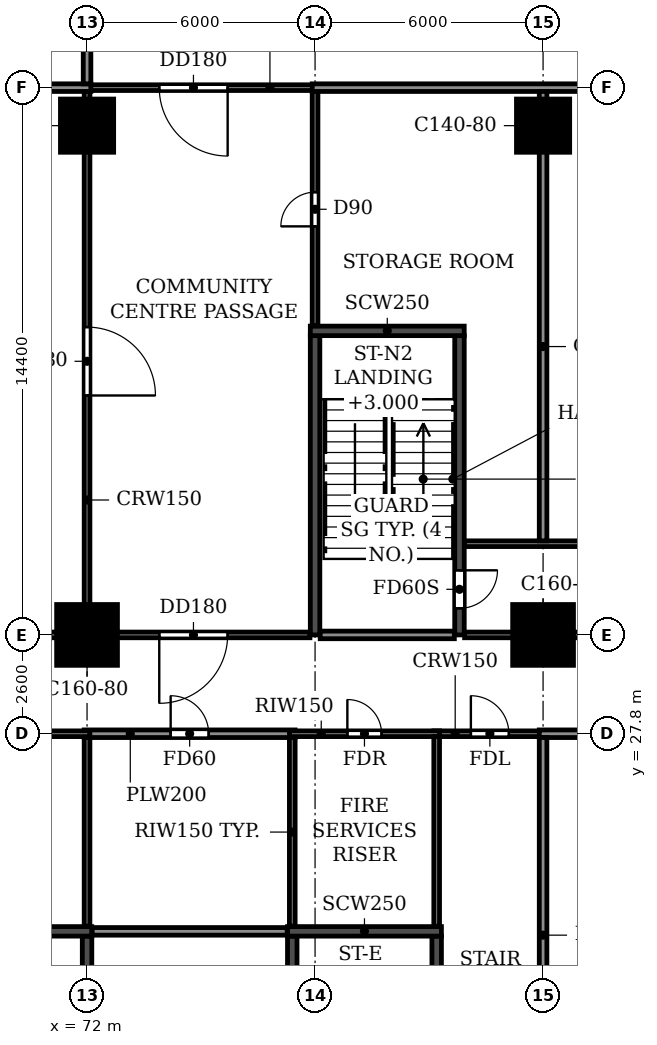
"""IFC4 building model, lengths in metres.
Left out: names, types, materials, properties, quantities, classifications, styles, units other than length and angle.
Written with IfcOpenShell. Run it as: python <this file> out.ifc"""

import sys

from ifc_helpers import new_model, si_unit, direction, frame, frame_2d, origin, origin_2d, place, context, subcontext, project, spatial, rectangle, extrude, source, transform, mapped, element, fill, save


model = new_model("IFC4")
c1 = context("Model", 3, precision=1e-05, world=origin(), true_north=direction((0.0, 1.0)))
c2 = subcontext(c1, "Body", "Model", "MODEL_VIEW")
j1 = project(units=[si_unit("LENGTHUNIT", "METRE"), si_unit("PLANEANGLEUNIT", "RADIAN")], contexts=[c1])
p1 = place(None, origin())
s1 = spatial("IfcSite", under=j1, at=p1, CompositionType="ELEMENT")
p2 = place(p1, origin())
s2 = spatial("IfcBuilding", under=s1, at=p2, CompositionType="ELEMENT")
p3 = place(p2, origin())
s3 = spatial("IfcBuildingStorey", under=s2, at=p3, CompositionType="ELEMENT", Elevation=0.0)
m1 = source(origin(), c2, "Body", "SweptSolid", [
    extrude(rectangle(XDim=1.6, YDim=1.6, at=origin_2d()), origin(), (0.0, 0.0, 1.0), 4.5),
])
p4 = place(p3, frame((72.0, 30.4, -0.3), z_axis=(0.0, 0.0, 1.0), x_axis=(1.0, 0.0, 0.0)))
e1 = element("IfcColumn", 1, at=p4, inside=s3, PredefinedType="COLUMN", context=c2, shape_type="MappedRepresentation", body=[
    mapped(m1, transform((0.0, 0.0, 0.0))),
])
m2 = source(origin(), c2, "Body", "SweptSolid", [
    extrude(rectangle(XDim=1.4, YDim=1.4, at=origin_2d()), origin(), (0.0, 0.0, 1.0), 4.5),
])
p5 = place(p3, frame((72.0, 43.8, -0.3), z_axis=(0.0, 0.0, 1.0), x_axis=(1.0, 0.0, 0.0)))
e2 = element("IfcColumn", 2, at=p5, inside=s3, PredefinedType="COLUMN", context=c2, shape_type="MappedRepresentation", body=[
    mapped(m2, transform((0.0, 0.0, 0.0))),
])
p6 = place(p3, frame((84.0, 30.4, -0.3), z_axis=(0.0, 0.0, 1.0), x_axis=(1.0, 0.0, 0.0)))
e3 = element("IfcColumn", 3, at=p6, inside=s3, PredefinedType="COLUMN", context=c2, shape_type="MappedRepresentation", body=[
    mapped(m1, transform((0.0, 0.0, 0.0))),
])
p7 = place(p3, frame((84.0, 43.8, -0.3), z_axis=(0.0, 0.0, 1.0), x_axis=(1.0, 0.0, 0.0)))
e4 = element("IfcColumn", 4, at=p7, inside=s3, PredefinedType="COLUMN", context=c2, shape_type="MappedRepresentation", body=[
    mapped(m2, transform((0.0, 0.0, 0.0))),
])
p8 = place(p3, frame((72.0, 14.6, 0.0), z_axis=(0.0, 0.0, 1.0), x_axis=(0.0, 1.0, 0.0)))
e5 = element("IfcWall", 5, at=p8, inside=s3, PredefinedType="SOLIDWALL", context=c2, shape_type="SweptSolid", body=[
    extrude(rectangle(XDim=7.875, YDim=0.25, at=frame_2d((3.938, 0.0))), origin(), (0.0, 0.0, 1.0), 4.2),
])
p9 = place(p3, frame((68.075, 22.6, 0.0), z_axis=(0.0, 0.0, 1.0), x_axis=(1.0, 0.0, 0.0)))
e6 = element("IfcWall", 6, at=p9, inside=s3, PredefinedType="SOLIDWALL", context=c2, shape_type="SweptSolid", body=[
    extrude(rectangle(XDim=4.05, YDim=0.25, at=frame_2d((2.025, 0.0))), origin(), (0.0, 0.0, 1.0), 4.2),
])
p10 = place(p3, frame((77.4, 14.6, 0.0), z_axis=(0.0, 0.0, 1.0), x_axis=(0.0, 1.0, 0.0)))
e7 = element("IfcWall", 7, at=p10, inside=s3, PredefinedType="SOLIDWALL", context=c2, shape_type="SweptSolid", body=[
    extrude(rectangle(XDim=7.875, YDim=0.25, at=frame_2d((3.938, 0.0))), origin(), (0.0, 0.0, 1.0), 4.2),
])
p11 = place(p3, frame((81.2, 14.6, 0.0), z_axis=(0.0, 0.0, 1.0), x_axis=(0.0, 1.0, 0.0)))
e8 = element("IfcWall", 8, at=p11, inside=s3, PredefinedType="SOLIDWALL", context=c2, shape_type="SweptSolid", body=[
    extrude(rectangle(XDim=7.875, YDim=0.25, at=frame_2d((3.938, 0.0))), origin(), (0.0, 0.0, 1.0), 4.2),
])
p12 = place(p11, frame((0.7, 0.0, 0.0)))
e9 = element("IfcOpeningElement", 9, at=p12, cuts=e8, PredefinedType="OPENING", context=c2, shape_type="SweptSolid", body=[
    extrude(rectangle(XDim=1.0, YDim=2.1, at=frame_2d((0.5, 1.05))), frame((0.0, 0.135, 0.0), z_axis=(0.0, -1.0, 0.0), x_axis=(1.0, 0.0, 0.0)), (0.0, 0.0, 1.0), 0.27),
])
p13 = place(p3, frame((77.275, 22.6, 0.0), z_axis=(0.0, 0.0, 1.0), x_axis=(1.0, 0.0, 0.0)))
e10 = element("IfcWall", 10, at=p13, inside=s3, PredefinedType="SOLIDWALL", context=c2, shape_type="SweptSolid", body=[
    extrude(rectangle(XDim=4.05, YDim=0.25, at=frame_2d((2.025, 0.0))), origin(), (0.0, 0.0, 1.0), 4.2),
])
p14 = place(p3, frame((81.8, 30.4, 0.0), z_axis=(0.0, 0.0, 1.0), x_axis=(0.0, 1.0, 0.0)))
e11 = element("IfcWall", 11, at=p14, inside=s3, PredefinedType="SOLIDWALL", context=c2, shape_type="SweptSolid", body=[
    extrude(rectangle(XDim=7.875, YDim=0.25, at=frame_2d((3.938, 0.0))), origin(), (0.0, 0.0, 1.0), 4.2),
])
p15 = place(p14, frame((0.7, 0.0, 0.0)))
e12 = element("IfcOpeningElement", 12, at=p15, cuts=e11, PredefinedType="OPENING", context=c2, shape_type="SweptSolid", body=[
    extrude(rectangle(XDim=1.0, YDim=2.1, at=frame_2d((0.5, 1.05))), frame((0.0, 0.135, 0.0), z_axis=(0.0, -1.0, 0.0), x_axis=(1.0, 0.0, 0.0)), (0.0, 0.0, 1.0), 0.27),
])
p16 = place(p3, frame((77.875, 38.4, 0.0), z_axis=(0.0, 0.0, 1.0), x_axis=(1.0, 0.0, 0.0)))
e13 = element("IfcWall", 13, at=p16, inside=s3, PredefinedType="SOLIDWALL", context=c2, shape_type="SweptSolid", body=[
    extrude(rectangle(XDim=4.05, YDim=0.25, at=frame_2d((2.025, 0.0))), origin(), (0.0, 0.0, 1.0), 4.2),
])
p17 = place(p3, frame((78.0, 30.4, 0.0), z_axis=(0.0, 0.0, 1.0), x_axis=(0.0, 1.0, 0.0)))
e14 = element("IfcWall", 14, at=p17, inside=s3, PredefinedType="SOLIDWALL", context=c2, shape_type="SweptSolid", body=[
    extrude(rectangle(XDim=7.875, YDim=0.25, at=frame_2d((3.938, 0.0))), origin(), (0.0, 0.0, 1.0), 4.2),
])
p18 = place(p3, frame((81.125, 27.8, 0.0), z_axis=(0.0, 0.0, 1.0), x_axis=(1.0, 0.0, 0.0)))
e15 = element("IfcWall", 15, at=p18, inside=s3, PredefinedType="PARTITIONING", context=c2, shape_type="SweptSolid", body=[
    extrude(rectangle(XDim=2.975, YDim=0.15, at=frame_2d((1.488, 0.0))), origin(), (0.0, 0.0, 1.0), 4.2),
])
p19 = place(p18, frame((0.975, 0.0, 0.0)))
e16 = element("IfcOpeningElement", 16, at=p19, cuts=e15, PredefinedType="OPENING", context=c2, shape_type="SweptSolid", body=[
    extrude(rectangle(XDim=1.0, YDim=2.1, at=frame_2d((0.5, 1.05))), frame((0.0, 0.085, 0.0), z_axis=(0.0, -1.0, 0.0), x_axis=(1.0, 0.0, 0.0)), (0.0, 0.0, 1.0), 0.17),
])
p20 = place(p3, frame((57.935, 30.4, 0.0), z_axis=(0.0, 0.0, 1.0), x_axis=(1.0, 0.0, 0.0)))
e17 = element("IfcWall", 17, at=p20, inside=s3, PredefinedType="PARTITIONING", context=c2, shape_type="SweptSolid", body=[
    extrude(rectangle(XDim=19.93, YDim=0.15, at=frame_2d((9.965, 0.0))), origin(), (0.0, 0.0, 1.0), 4.2),
])
p21 = place(p20, frame((0.065, 0.0, 0.0)))
e18 = element("IfcOpeningElement", 18, at=p21, cuts=e17, PredefinedType="OPENING", context=c2, shape_type="SweptSolid", body=[
    extrude(rectangle(XDim=0.9, YDim=2.1, at=frame_2d((0.45, 1.05))), frame((0.0, 0.085, 0.0), z_axis=(0.0, -1.0, 0.0), x_axis=(1.0, 0.0, 0.0)), (0.0, 0.0, 1.0), 0.17),
])
p22 = place(p20, frame((15.965, 0.0, 0.0)))
e19 = element("IfcOpeningElement", 19, at=p22, cuts=e17, PredefinedType="OPENING", context=c2, shape_type="SweptSolid", body=[
    extrude(rectangle(XDim=1.8, YDim=2.1, at=frame_2d((0.9, 1.05))), frame((0.0, 0.085, 0.0), z_axis=(0.0, -1.0, 0.0), x_axis=(1.0, 0.0, 0.0)), (0.0, 0.0, 1.0), 0.17),
])
p23 = place(p3, frame((81.935, 30.4, 0.0), z_axis=(0.0, 0.0, 1.0), x_axis=(1.0, 0.0, 0.0)))
e20 = element("IfcWall", 20, at=p23, inside=s3, PredefinedType="PARTITIONING", context=c2, shape_type="SweptSolid", body=[
    extrude(rectangle(XDim=20.065, YDim=0.15, at=frame_2d((10.032, 0.0))), origin(), (0.0, 0.0, 1.0), 4.2),
])
p24 = place(p23, frame((9.515, 0.0, 0.0)))
e21 = element("IfcOpeningElement", 21, at=p24, cuts=e20, PredefinedType="OPENING", context=c2, shape_type="SweptSolid", body=[
    extrude(rectangle(XDim=0.9, YDim=2.1, at=frame_2d((0.45, 1.05))), frame((0.0, 0.085, 0.0), z_axis=(0.0, -1.0, 0.0), x_axis=(1.0, 0.0, 0.0)), (0.0, 0.0, 1.0), 0.17),
])
p25 = place(p3, frame((81.935, 32.8, 0.0), z_axis=(0.0, 0.0, 1.0), x_axis=(1.0, 0.0, 0.0)))
e22 = element("IfcWall", 22, at=p25, inside=s3, PredefinedType="PARTITIONING", context=c2, shape_type="SweptSolid", body=[
    extrude(rectangle(XDim=20.065, YDim=0.15, at=frame_2d((10.032, 0.0))), origin(), (0.0, 0.0, 1.0), 4.2),
])
p26 = place(p25, frame((10.615, 0.0, 0.0)))
e23 = element("IfcOpeningElement", 23, at=p26, cuts=e22, PredefinedType="OPENING", context=c2, shape_type="SweptSolid", body=[
    extrude(rectangle(XDim=0.9, YDim=2.1, at=frame_2d((0.45, 1.05))), frame((0.0, 0.085, 0.0), z_axis=(0.0, -1.0, 0.0), x_axis=(1.0, 0.0, 0.0)), (0.0, 0.0, 1.0), 0.17),
])
p27 = place(p3, frame((71.9, 44.8, 0.0), z_axis=(0.0, 0.0, 1.0), x_axis=(1.0, 0.0, 0.0)))
e24 = element("IfcWall", 24, at=p27, inside=s3, PredefinedType="PARTITIONING", context=c2, shape_type="SweptSolid", body=[
    extrude(rectangle(XDim=6.175, YDim=0.15, at=frame_2d((3.087, 0.0))), origin(), (0.0, 0.0, 1.0), 4.2),
])
p28 = place(p27, frame((2.0, 0.0, 0.0)))
e25 = element("IfcOpeningElement", 25, at=p28, cuts=e24, PredefinedType="OPENING", context=c2, shape_type="SweptSolid", body=[
    extrude(rectangle(XDim=1.8, YDim=2.1, at=frame_2d((0.9, 1.05))), frame((0.0, 0.085, 0.0), z_axis=(0.0, -1.0, 0.0), x_axis=(1.0, 0.0, 0.0)), (0.0, 0.0, 1.0), 0.17),
])
p29 = place(p3, frame((72.0, 30.475, 0.0), z_axis=(0.0, 0.0, 1.0), x_axis=(0.0, 1.0, 0.0)))
e26 = element("IfcWall", 26, at=p29, inside=s3, PredefinedType="PARTITIONING", context=c2, shape_type="SweptSolid", body=[
    extrude(rectangle(XDim=14.225, YDim=0.15, at=frame_2d((7.112, 0.0))), origin(), (0.0, 0.0, 1.0), 4.2),
])
p30 = place(p29, frame((6.225, 0.0, 0.0)))
e27 = element("IfcOpeningElement", 27, at=p30, cuts=e26, PredefinedType="OPENING", context=c2, shape_type="SweptSolid", body=[
    extrude(rectangle(XDim=1.8, YDim=2.1, at=frame_2d((0.9, 1.05))), frame((0.0, 0.085, 0.0), z_axis=(0.0, -1.0, 0.0), x_axis=(1.0, 0.0, 0.0)), (0.0, 0.0, 1.0), 0.17),
])
p31 = place(p3, frame((78.0, 38.535, 0.0), z_axis=(0.0, 0.0, 1.0), x_axis=(0.0, 1.0, 0.0)))
e28 = element("IfcWall", 28, at=p31, inside=s3, PredefinedType="PARTITIONING", context=c2, shape_type="SweptSolid", body=[
    extrude(rectangle(XDim=6.165, YDim=0.15, at=frame_2d((3.083, 0.0))), origin(), (0.0, 0.0, 1.0), 4.2),
])
p32 = place(p31, frame((2.615, 0.0, 0.0)))
e29 = element("IfcOpeningElement", 29, at=p32, cuts=e28, PredefinedType="OPENING", context=c2, shape_type="SweptSolid", body=[
    extrude(rectangle(XDim=0.9, YDim=2.1, at=frame_2d((0.45, 1.05))), frame((0.0, 0.085, 0.0), z_axis=(0.0, -1.0, 0.0), x_axis=(1.0, 0.0, 0.0)), (0.0, 0.0, 1.0), 0.17),
])
p33 = place(p3, frame((72.135, 22.6, 0.0), z_axis=(0.0, 0.0, 1.0), x_axis=(1.0, 0.0, 0.0)))
e30 = element("IfcWall", 30, at=p33, inside=s3, PredefinedType="PARTITIONING", context=c2, shape_type="SweptSolid", body=[
    extrude(rectangle(XDim=5.13, YDim=0.2, at=frame_2d((2.565, 0.0))), origin(), (0.0, 0.0, 1.0), 4.2),
])
p34 = place(p3, frame((71.925, 27.8, 0.0), z_axis=(0.0, 0.0, 1.0), x_axis=(1.0, 0.0, 0.0)))
e31 = element("IfcWall", 31, at=p34, inside=s3, PredefinedType="PARTITIONING", context=c2, shape_type="SweptSolid", body=[
    extrude(rectangle(XDim=5.55, YDim=0.2, at=frame_2d((2.775, 0.0))), origin(), (0.0, 0.0, 1.0), 4.2),
])
p35 = place(p34, frame((2.275, 0.0, 0.0)))
e32 = element("IfcOpeningElement", 32, at=p35, cuts=e31, PredefinedType="OPENING", context=c2, shape_type="SweptSolid", body=[
    extrude(rectangle(XDim=1.0, YDim=2.1, at=frame_2d((0.5, 1.05))), frame((0.0, 0.11, 0.0), z_axis=(0.0, -1.0, 0.0), x_axis=(1.0, 0.0, 0.0)), (0.0, 0.0, 1.0), 0.22),
])
p36 = place(p3, frame((83.9, 27.8, 0.0), z_axis=(0.0, 0.0, 1.0), x_axis=(1.0, 0.0, 0.0)))
e33 = element("IfcWall", 33, at=p36, inside=s3, PredefinedType="PARTITIONING", context=c2, shape_type="SweptSolid", body=[
    extrude(rectangle(XDim=18.1, YDim=0.2, at=frame_2d((9.05, 0.0))), origin(), (0.0, 0.0, 1.0), 4.2),
])
p37 = place(p36, frame((8.35, 0.0, 0.0)))
e34 = element("IfcOpeningElement", 34, at=p37, cuts=e33, PredefinedType="OPENING", context=c2, shape_type="SweptSolid", body=[
    extrude(rectangle(XDim=1.5, YDim=2.1, at=frame_2d((0.75, 1.05))), frame((0.0, 0.11, 0.0), z_axis=(0.0, -1.0, 0.0), x_axis=(1.0, 0.0, 0.0)), (0.0, 0.0, 1.0), 0.22),
])
p38 = place(p3, frame((84.0, 17.3, 0.0), z_axis=(0.0, 0.0, 1.0), x_axis=(0.0, 1.0, 0.0)))
e35 = element("IfcWall", 35, at=p38, inside=s3, PredefinedType="PARTITIONING", context=c2, shape_type="SweptSolid", body=[
    extrude(rectangle(XDim=10.4, YDim=0.2, at=frame_2d((5.2, 0.0))), origin(), (0.0, 0.0, 1.0), 4.2),
])
p39 = place(p3, frame((53.925, 44.8, 0.0), z_axis=(0.0, 0.0, 1.0), x_axis=(1.0, 0.0, 0.0)))
e36 = element("IfcWall", 36, at=p39, inside=s3, PredefinedType="PARTITIONING", context=c2, shape_type="SweptSolid", body=[
    extrude(rectangle(XDim=18.175, YDim=0.2, at=frame_2d((9.087, 0.0))), origin(), (0.0, 0.0, 1.0), 4.2),
])
p40 = place(p3, frame((77.925, 44.8, 0.0), z_axis=(0.0, 0.0, 1.0), x_axis=(1.0, 0.0, 0.0)))
e37 = element("IfcWall", 37, at=p40, inside=s3, PredefinedType="PARTITIONING", context=c2, shape_type="SweptSolid", body=[
    extrude(rectangle(XDim=24.075, YDim=0.2, at=frame_2d((12.038, 0.0))), origin(), (0.0, 0.0, 1.0), 4.2),
])
p41 = place(p3, frame((72.0, 44.9, 0.0), z_axis=(0.0, 0.0, 1.0), x_axis=(0.0, 1.0, 0.0)))
e38 = element("IfcWall", 38, at=p41, inside=s3, PredefinedType="PARTITIONING", context=c2, shape_type="SweptSolid", body=[
    extrude(rectangle(XDim=17.0, YDim=0.2, at=frame_2d((8.5, 0.0))), origin(), (0.0, 0.0, 1.0), 5.68),
])
p42 = place(p3, frame((84.0, 32.875, 0.0), z_axis=(0.0, 0.0, 1.0), x_axis=(0.0, 1.0, 0.0)))
e39 = element("IfcWall", 39, at=p42, inside=s3, PredefinedType="PARTITIONING", context=c2, shape_type="SweptSolid", body=[
    extrude(rectangle(XDim=11.825, YDim=0.2, at=frame_2d((5.913, 0.0))), origin(), (0.0, 0.0, 1.0), 4.2),
])
p43 = place(p3, frame((68.125, 27.8, 0.0), z_axis=(0.0, 0.0, 1.0), x_axis=(1.0, 0.0, 0.0)))
e40 = element("IfcWall", 40, at=p43, inside=s3, PredefinedType="PARTITIONING", context=c2, shape_type="SweptSolid", body=[
    extrude(rectangle(XDim=3.95, YDim=0.15, at=frame_2d((1.975, 0.0))), origin(), (0.0, 0.0, 1.0), 4.2),
])
p44 = place(p43, frame((1.525, 0.0, 0.0)))
e41 = element("IfcOpeningElement", 41, at=p44, cuts=e40, PredefinedType="OPENING", context=c2, shape_type="SweptSolid", body=[
    extrude(rectangle(XDim=0.9, YDim=2.1, at=frame_2d((0.45, 1.05))), frame((0.0, 0.085, 0.0), z_axis=(0.0, -1.0, 0.0), x_axis=(1.0, 0.0, 0.0)), (0.0, 0.0, 1.0), 0.17),
])
p45 = place(p3, frame((77.325, 27.8, 0.0), z_axis=(0.0, 0.0, 1.0), x_axis=(1.0, 0.0, 0.0)))
e42 = element("IfcWall", 42, at=p45, inside=s3, PredefinedType="PARTITIONING", context=c2, shape_type="SweptSolid", body=[
    extrude(rectangle(XDim=3.95, YDim=0.15, at=frame_2d((1.975, 0.0))), origin(), (0.0, 0.0, 1.0), 4.2),
])
p46 = place(p45, frame((1.525, 0.0, 0.0)))
e43 = element("IfcOpeningElement", 43, at=p46, cuts=e42, PredefinedType="OPENING", context=c2, shape_type="SweptSolid", body=[
    extrude(rectangle(XDim=0.9, YDim=2.1, at=frame_2d((0.45, 1.05))), frame((0.0, 0.085, 0.0), z_axis=(0.0, -1.0, 0.0), x_axis=(1.0, 0.0, 0.0)), (0.0, 0.0, 1.0), 0.17),
])
for number, where, z_axis, x_axis in (
    (44, (72.0, 22.735, 0.0), (0.0, 0.0, 1.0), (0.0, 1.0, 0.0)),
    (45, (77.4, 22.735, 0.0), (0.0, 0.0, 1.0), (0.0, 1.0, 0.0)),
):
    element("IfcWall", number, at=place(p3, frame(where, z_axis=z_axis, x_axis=x_axis)), inside=s3, PredefinedType="PARTITIONING", context=c2, shape_type="SweptSolid", body=[
        extrude(rectangle(XDim=4.965, YDim=0.15, at=frame_2d((2.482, 0.0))), origin(), (0.0, 0.0, 1.0), 4.2),
    ])
p47 = place(p3, frame((81.2, 22.735, 0.0), z_axis=(0.0, 0.0, 1.0), x_axis=(0.0, 1.0, 0.0)))
e46 = element("IfcWall", 46, at=p47, inside=s3, PredefinedType="PARTITIONING", context=c2, shape_type="SweptSolid", body=[
    extrude(rectangle(XDim=4.99, YDim=0.15, at=frame_2d((2.495, 0.0))), origin(), (0.0, 0.0, 1.0), 4.2),
])
p48 = place(p3, frame((78.135, 30.4, 0.0), z_axis=(0.0, 0.0, 1.0), x_axis=(1.0, 0.0, 0.0)))
e47 = element("IfcWall", 47, at=p48, inside=s3, PredefinedType="PARTITIONING", context=c2, shape_type="SweptSolid", body=[
    extrude(rectangle(XDim=3.53, YDim=0.2, at=frame_2d((1.765, 0.0))), origin(), (0.0, 0.0, 1.0), 4.2),
])
p49 = place(p35, origin())
e48 = element("IfcDoor", 48, at=p49, inside=s3, OperationType="SINGLE_SWING_LEFT", PredefinedType="DOOR", context=c2, shape_type="SweptSolid", body=[
    extrude(rectangle(XDim=1.0, YDim=2.1, at=frame_2d((0.5, 1.05))), frame((0.0, 0.025, 0.0), z_axis=(0.0, -1.0, 0.0), x_axis=(1.0, 0.0, 0.0)), (0.0, 0.0, 1.0), 0.05),
])
fill(e32, e48)
p50 = place(p22, frame((1.8, 0.0, 0.0), z_axis=(0.0, 0.0, 1.0), x_axis=(-1.0, 0.0, 0.0)))
e49 = element("IfcDoor", 49, at=p50, inside=s3, OperationType="DOUBLE_DOOR_SINGLE_SWING", PredefinedType="DOOR", context=c2, shape_type="SweptSolid", body=[
    extrude(rectangle(XDim=1.8, YDim=2.1, at=frame_2d((0.9, 1.05))), frame((0.0, 0.025, 0.0), z_axis=(0.0, -1.0, 0.0), x_axis=(1.0, 0.0, 0.0)), (0.0, 0.0, 1.0), 0.05),
])
fill(e19, e49)
p51 = place(p46, origin())
e50 = element("IfcDoor", 50, at=p51, inside=s3, OperationType="SINGLE_SWING_LEFT", PredefinedType="DOOR", context=c2, shape_type="SweptSolid", body=[
    extrude(rectangle(XDim=0.9, YDim=2.1, at=frame_2d((0.45, 1.05))), frame((0.0, 0.025, 0.0), z_axis=(0.0, -1.0, 0.0), x_axis=(1.0, 0.0, 0.0)), (0.0, 0.0, 1.0), 0.05),
])
fill(e43, e50)
p52 = place(p19, origin())
e51 = element("IfcDoor", 51, at=p52, inside=s3, OperationType="SINGLE_SWING_LEFT", PredefinedType="DOOR", context=c2, shape_type="SweptSolid", body=[
    extrude(rectangle(XDim=1.0, YDim=2.1, at=frame_2d((0.5, 1.05))), frame((0.0, 0.025, 0.0), z_axis=(0.0, -1.0, 0.0), x_axis=(1.0, 0.0, 0.0)), (0.0, 0.0, 1.0), 0.05),
])
fill(e16, e51)
p53 = place(p30, frame((1.8, 0.0, 0.0), z_axis=(0.0, 0.0, 1.0), x_axis=(-1.0, 0.0, 0.0)))
e52 = element("IfcDoor", 52, at=p53, inside=s3, OperationType="DOUBLE_DOOR_SINGLE_SWING", PredefinedType="DOOR", context=c2, shape_type="SweptSolid", body=[
    extrude(rectangle(XDim=1.8, YDim=2.1, at=frame_2d((0.9, 1.05))), frame((0.0, 0.025, 0.0), z_axis=(0.0, -1.0, 0.0), x_axis=(1.0, 0.0, 0.0)), (0.0, 0.0, 1.0), 0.05),
])
fill(e27, e52)
p54 = place(p28, frame((1.8, 0.0, 0.0), z_axis=(0.0, 0.0, 1.0), x_axis=(-1.0, 0.0, 0.0)))
e53 = element("IfcDoor", 53, at=p54, inside=s3, OperationType="DOUBLE_DOOR_SINGLE_SWING", PredefinedType="DOOR", context=c2, shape_type="SweptSolid", body=[
    extrude(rectangle(XDim=1.8, YDim=2.1, at=frame_2d((0.9, 1.05))), frame((0.0, 0.025, 0.0), z_axis=(0.0, -1.0, 0.0), x_axis=(1.0, 0.0, 0.0)), (0.0, 0.0, 1.0), 0.05),
])
fill(e25, e53)
p55 = place(p32, origin())
e54 = element("IfcDoor", 54, at=p55, inside=s3, OperationType="SINGLE_SWING_LEFT", PredefinedType="DOOR", context=c2, shape_type="SweptSolid", body=[
    extrude(rectangle(XDim=0.9, YDim=2.1, at=frame_2d((0.45, 1.05))), frame((0.0, 0.025, 0.0), z_axis=(0.0, -1.0, 0.0), x_axis=(1.0, 0.0, 0.0)), (0.0, 0.0, 1.0), 0.05),
])
fill(e29, e54)
p56 = place(p15, frame((1.0, 0.0, 0.0), z_axis=(0.0, 0.0, 1.0), x_axis=(-1.0, 0.0, 0.0)))
e55 = element("IfcDoor", 55, at=p56, inside=s3, OperationType="SINGLE_SWING_LEFT", PredefinedType="DOOR", context=c2, shape_type="SweptSolid", body=[
    extrude(rectangle(XDim=1.0, YDim=2.1, at=frame_2d((0.5, 1.05))), frame((0.0, 0.025, 0.0), z_axis=(0.0, -1.0, 0.0), x_axis=(1.0, 0.0, 0.0)), (0.0, 0.0, 1.0), 0.05),
])
fill(e12, e55)
save(model, sys.argv[1])
